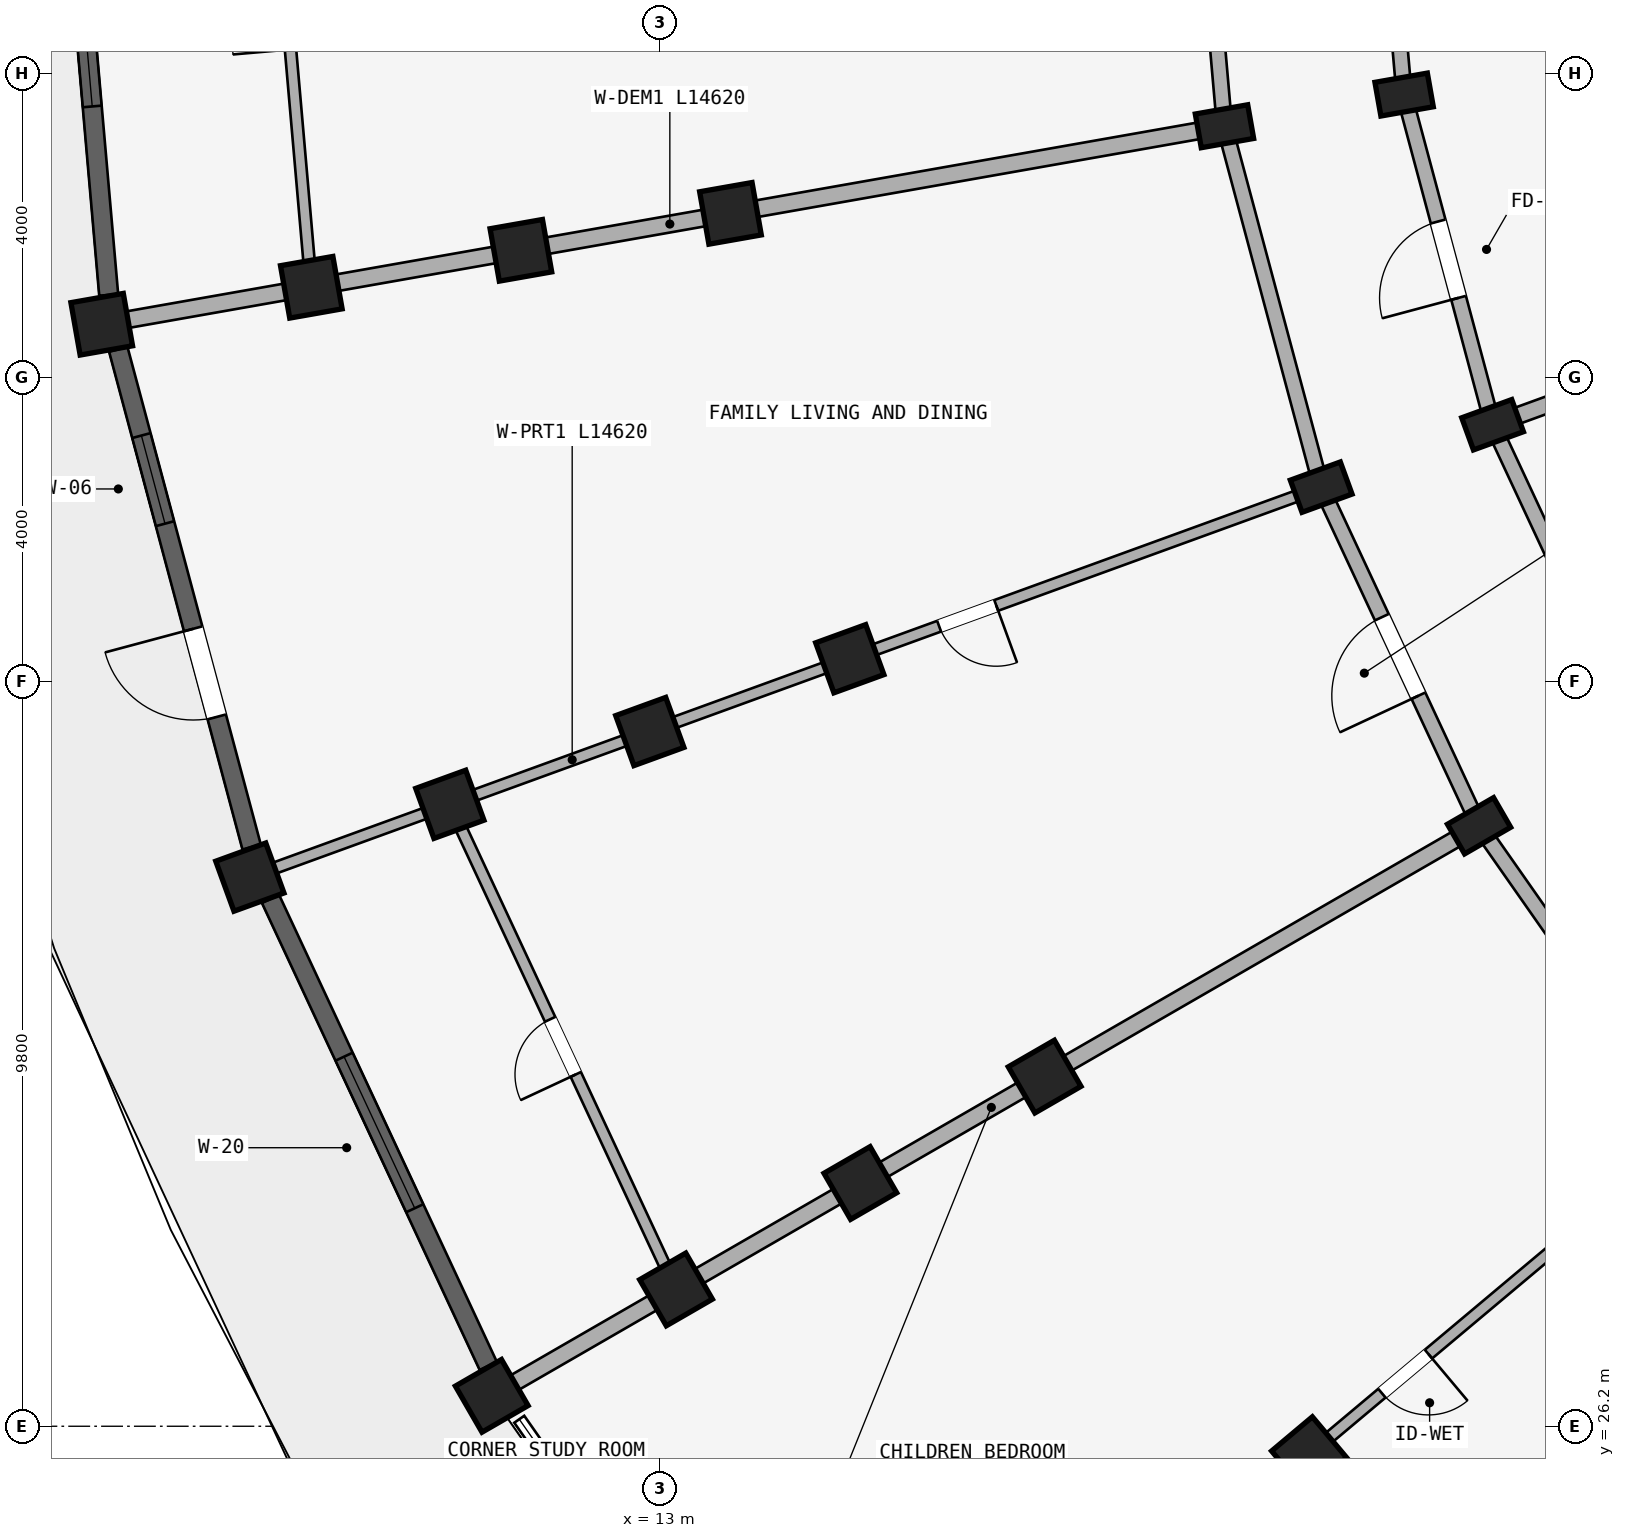
"""IFC4 building model, lengths in metres.
Left out: names, types, materials, properties, quantities, classifications, styles, units other than length and angle.
Written with IfcOpenShell. Run it as: python <this file> out.ifc"""

import sys

from ifc_helpers import new_model, si_unit, direction, frame, frame_2d, origin, origin_2d, place, context, subcontext, project, spatial, rectangle, extrude, element, fill, save


model = new_model("IFC4")
c1 = context("Model", 3, precision=1e-05, world=origin(), true_north=direction((0.0, 1.0)))
c2 = subcontext(c1, "Body", "Model", "MODEL_VIEW")
j1 = project(units=[si_unit("LENGTHUNIT", "METRE"), si_unit("PLANEANGLEUNIT", "RADIAN")], contexts=[c1])
p1 = place(None, origin())
s1 = spatial("IfcSite", under=j1, at=p1, CompositionType="ELEMENT")
p2 = place(p1, origin())
s2 = spatial("IfcBuilding", under=s1, at=p2, CompositionType="ELEMENT")
p3 = place(p2, frame((0.0, 0.0, 21.3)))
s3 = spatial("IfcBuildingStorey", under=s2, at=p3, CompositionType="ELEMENT", Elevation=21.3)
p4 = place(p3, frame((21.542, 25.831, 0.0), z_axis=(0.0, 0.0, 1.0), x_axis=(-0.642787609687, 0.766044443119, 0.0)))
e1 = element("IfcColumn", 1, at=p4, inside=s3, PredefinedType="COLUMN", context=c2, shape_type="SweptSolid", body=[
    extrude(rectangle(XDim=0.7, YDim=0.7, at=origin_2d()), origin(), (0.0, 0.0, 1.0), 2.93),
])
p5 = place(p3, frame((23.778, 34.1, 0.0), z_axis=(0.0, 0.0, 1.0), x_axis=(-0.5, 0.866025403784, 0.0)))
e2 = element("IfcColumn", 2, at=p5, inside=s3, PredefinedType="COLUMN", context=c2, shape_type="SweptSolid", body=[
    extrude(rectangle(XDim=0.45, YDim=0.7, at=origin_2d()), origin(), (0.0, 0.0, 1.0), 2.93),
])
for number, where, z_axis, x_axis in (
    (3, (18.062, 30.8, 0.0), (0.0, 0.0, 1.0), (-0.5, 0.866, 0.0)),
    (4, (15.637, 29.4, 0.0), (0.0, 0.0, 1.0), (-0.5, 0.866, 0.0)),
    (5, (13.213, 28.0, 0.0), (0.0, 0.0, 1.0), (-0.5, 0.866, 0.0)),
):
    element("IfcColumn", number, at=place(p3, frame(where, z_axis=z_axis, x_axis=x_axis)), inside=s3, PredefinedType="COLUMN", context=c2, shape_type="SweptSolid", body=[
        extrude(rectangle(XDim=0.7, YDim=0.7, at=origin_2d()), origin(), (0.0, 0.0, 1.0), 2.93),
    ])
p6 = place(p3, frame((10.788, 26.6, 0.0), z_axis=(0.0, 0.0, 1.0), x_axis=(-0.5, 0.866025403784, 0.0)))
e6 = element("IfcColumn", 6, at=p6, inside=s3, PredefinedType="COLUMN", context=c2, shape_type="SweptSolid", body=[
    extrude(rectangle(XDim=0.7, YDim=0.7, at=origin_2d()), origin(), (0.0, 0.0, 1.0), 2.97),
])
for number, where, z_axis, x_axis in (
    (7, (23.956, 39.376, 0.0), (0.0, 0.0, 1.0), (-0.342, 0.94, 0.0)),
    (8, (21.701, 38.555, 0.0), (0.0, 0.0, 1.0), (-0.342, 0.94, 0.0)),
):
    element("IfcColumn", number, at=place(p3, frame(where, z_axis=z_axis, x_axis=x_axis)), inside=s3, PredefinedType="COLUMN", context=c2, shape_type="SweptSolid", body=[
        extrude(rectangle(XDim=0.45, YDim=0.7, at=origin_2d()), origin(), (0.0, 0.0, 1.0), 2.93),
    ])
for number, where, z_axis, x_axis in (
    (9, (15.499, 36.298, 0.0), (0.0, 0.0, 1.0), (-0.342, 0.94, 0.0)),
    (10, (12.868, 35.34, 0.0), (0.0, 0.0, 1.0), (-0.342, 0.94, 0.0)),
    (11, (10.236, 34.382, 0.0), (0.0, 0.0, 1.0), (-0.342, 0.94, 0.0)),
):
    element("IfcColumn", number, at=place(p3, frame(where, z_axis=z_axis, x_axis=x_axis)), inside=s3, PredefinedType="COLUMN", context=c2, shape_type="SweptSolid", body=[
        extrude(rectangle(XDim=0.7, YDim=0.7, at=origin_2d()), origin(), (0.0, 0.0, 1.0), 2.93),
    ])
p7 = place(p3, frame((7.605, 33.425, 0.0), z_axis=(0.0, 0.0, 1.0), x_axis=(-0.342020143326, 0.939692620786, 0.0)))
e12 = element("IfcColumn", 12, at=p7, inside=s3, PredefinedType="COLUMN", context=c2, shape_type="SweptSolid", body=[
    extrude(rectangle(XDim=0.7, YDim=0.7, at=origin_2d()), origin(), (0.0, 0.0, 1.0), 2.97),
])
for number, where, z_axis, x_axis in (
    (13, (22.792, 43.72, 0.0), (0.0, 0.0, 1.0), (-0.174, 0.985, 0.0)),
    (14, (20.428, 43.303, 0.0), (0.0, 0.0, 1.0), (-0.174, 0.985, 0.0)),
):
    element("IfcColumn", number, at=place(p3, frame(where, z_axis=z_axis, x_axis=x_axis)), inside=s3, PredefinedType="COLUMN", context=c2, shape_type="SweptSolid", body=[
        extrude(rectangle(XDim=0.45, YDim=0.7, at=origin_2d()), origin(), (0.0, 0.0, 1.0), 2.93),
    ])
for number, where, z_axis, x_axis in (
    (15, (13.929, 42.157, 0.0), (0.0, 0.0, 1.0), (-0.174, 0.985, 0.0)),
    (16, (11.171, 41.671, 0.0), (0.0, 0.0, 1.0), (-0.174, 0.985, 0.0)),
    (17, (8.414, 41.185, 0.0), (0.0, 0.0, 1.0), (-0.174, 0.985, 0.0)),
):
    element("IfcColumn", number, at=place(p3, frame(where, z_axis=z_axis, x_axis=x_axis)), inside=s3, PredefinedType="COLUMN", context=c2, shape_type="SweptSolid", body=[
        extrude(rectangle(XDim=0.7, YDim=0.7, at=origin_2d()), origin(), (0.0, 0.0, 1.0), 2.93),
    ])
p8 = place(p3, frame((5.656, 40.698, 0.0), z_axis=(0.0, 0.0, 1.0), x_axis=(-0.173648177667, 0.984807753012, 0.0)))
e18 = element("IfcColumn", 18, at=p8, inside=s3, PredefinedType="COLUMN", context=c2, shape_type="SweptSolid", body=[
    extrude(rectangle(XDim=0.7, YDim=0.7, at=origin_2d()), origin(), (0.0, 0.0, 1.0), 2.97),
])
p9 = place(p3, frame((26.598, 30.073, 0.0), z_axis=(0.0, 0.0, 1.0), x_axis=(-0.573592335331, 0.819140911474, 0.0)))
e19 = element("IfcWall", 19, at=p9, inside=s3, PredefinedType="STANDARD", context=c2, shape_type="SweptSolid", body=[
    extrude(rectangle(XDim=4.916, YDim=0.2, at=frame_2d((2.458, 0.0))), origin(), (0.0, 0.0, 1.0), 2.372),
])
p10 = place(p3, frame((25.856, 35.3, 0.0), z_axis=(0.0, 0.0, 1.0), x_axis=(-0.422617978463, 0.906307919131, 0.0)))
e20 = element("IfcWall", 20, at=p10, inside=s3, PredefinedType="STANDARD", context=c2, shape_type="SweptSolid", body=[
    extrude(rectangle(XDim=4.497, YDim=0.2, at=frame_2d((2.249, 0.0))), origin(), (0.0, 0.0, 1.0), 2.372),
])
p11 = place(p3, frame((23.778, 34.1, 0.0), z_axis=(0.0, 0.0, 1.0), x_axis=(-0.422629854778, 0.906302381024, 0.0)))
e21 = element("IfcWall", 21, at=p11, inside=s3, PredefinedType="STANDARD", context=c2, shape_type="SweptSolid", body=[
    extrude(rectangle(XDim=4.915, YDim=0.2, at=frame_2d((2.458, 0.0))), origin(), (0.0, 0.0, 1.0), 2.372),
])
p12 = place(p11, frame((1.888, 0.0, 0.0)))
e22 = element("IfcOpeningElement", 22, at=p12, cuts=e21, PredefinedType="OPENING", context=c2, shape_type="SweptSolid", body=[
    extrude(rectangle(XDim=1.14, YDim=2.15, at=frame_2d((0.57, 1.075))), frame((0.0, 0.11, 0.0), z_axis=(0.0, -1.0, 0.0), x_axis=(1.0, 0.0, 0.0)), (0.0, 0.0, 1.0), 0.22),
])
p13 = place(p3, frame((23.956, 39.376, 0.0), z_axis=(0.0, 0.0, 1.0), x_axis=(-0.258787642463, 0.965934240054, 0.0)))
e23 = element("IfcWall", 23, at=p13, inside=s3, PredefinedType="STANDARD", context=c2, shape_type="SweptSolid", body=[
    extrude(rectangle(XDim=4.497, YDim=0.2, at=frame_2d((2.249, 0.0))), origin(), (0.0, 0.0, 1.0), 2.372),
])
p14 = place(p13, frame((1.729, 0.0, 0.0)))
e24 = element("IfcOpeningElement", 24, at=p14, cuts=e23, PredefinedType="OPENING", context=c2, shape_type="SweptSolid", body=[
    extrude(rectangle(XDim=1.04, YDim=2.15, at=frame_2d((0.52, 1.075))), frame((0.0, 0.11, 0.0), z_axis=(0.0, -1.0, 0.0), x_axis=(1.0, 0.0, 0.0)), (0.0, 0.0, 1.0), 0.22),
])
p15 = place(p3, frame((21.701, 38.555, 0.0), z_axis=(0.0, 0.0, 1.0), x_axis=(-0.258803112091, 0.965930095386, 0.0)))
e25 = element("IfcWall", 25, at=p15, inside=s3, PredefinedType="STANDARD", context=c2, shape_type="SweptSolid", body=[
    extrude(rectangle(XDim=4.916, YDim=0.2, at=frame_2d((2.458, 0.0))), origin(), (0.0, 0.0, 1.0), 2.372),
])
p16 = place(p3, frame((22.792, 43.72, 0.0), z_axis=(0.0, 0.0, 1.0), x_axis=(-0.087187153726, 0.996191949488, 0.0)))
e26 = element("IfcWall", 26, at=p16, inside=s3, PredefinedType="STANDARD", context=c2, shape_type="SweptSolid", body=[
    extrude(rectangle(XDim=4.497, YDim=0.2, at=frame_2d((2.249, 0.0))), origin(), (0.0, 0.0, 1.0), 2.372),
])
p17 = place(p3, frame((20.428, 43.303, 0.0), z_axis=(0.0, 0.0, 1.0), x_axis=(-0.087167566415, 0.996193663584, 0.0)))
e27 = element("IfcWall", 27, at=p17, inside=s3, PredefinedType="STANDARD", context=c2, shape_type="SweptSolid", body=[
    extrude(rectangle(XDim=4.916, YDim=0.2, at=frame_2d((2.458, 0.0))), origin(), (0.0, 0.0, 1.0), 2.372),
])
p18 = place(p17, frame((1.958, 0.0, 0.0)))
e28 = element("IfcOpeningElement", 28, at=p18, cuts=e27, PredefinedType="OPENING", context=c2, shape_type="SweptSolid", body=[
    extrude(rectangle(XDim=1.0, YDim=2.15, at=frame_2d((0.5, 1.075))), frame((0.0, 0.11, 0.0), z_axis=(0.0, -1.0, 0.0), x_axis=(1.0, 0.0, 0.0)), (0.0, 0.0, 1.0), 0.22),
])
p19 = place(p3, frame((30.009, 26.521, 0.0), z_axis=(0.0, 0.0, 1.0), x_axis=(-0.642779216656, -0.76605148563, 0.0)))
e29 = element("IfcWall", 29, at=p19, inside=s3, PredefinedType="PARTITIONING", context=c2, shape_type="SweptSolid", body=[
    extrude(rectangle(XDim=14.62, YDim=0.15, at=frame_2d((7.31, 0.0))), origin(), (0.0, 0.0, 1.0), 2.372),
])
p20 = place(p19, frame((4.449, 0.0, 0.0)))
e30 = element("IfcOpeningElement", 30, at=p20, cuts=e29, PredefinedType="OPENING", context=c2, shape_type="SweptSolid", body=[
    extrude(rectangle(XDim=0.8, YDim=2.1, at=frame_2d((0.4, 1.05))), frame((0.0, 0.085, 0.0), z_axis=(0.0, -1.0, 0.0), x_axis=(1.0, 0.0, 0.0)), (0.0, 0.0, 1.0), 0.17),
])
p21 = place(p3, frame((26.521, 30.009, 0.0), z_axis=(0.0, 0.0, 1.0), x_axis=(-0.76605148563, -0.642779216656, 0.0)))
e31 = element("IfcWall", 31, at=p21, inside=s3, PredefinedType="PARTITIONING", context=c2, shape_type="SweptSolid", body=[
    extrude(rectangle(XDim=14.62, YDim=0.15, at=frame_2d((7.31, 0.0))), origin(), (0.0, 0.0, 1.0), 2.372),
])
p22 = place(p21, frame((4.449, 0.0, 0.0)))
e32 = element("IfcOpeningElement", 32, at=p22, cuts=e31, PredefinedType="OPENING", context=c2, shape_type="SweptSolid", body=[
    extrude(rectangle(XDim=0.8, YDim=2.1, at=frame_2d((0.4, 1.05))), frame((0.0, 0.085, 0.0), z_axis=(0.0, -1.0, 0.0), x_axis=(1.0, 0.0, 0.0)), (0.0, 0.0, 1.0), 0.17),
])
p23 = place(p3, frame((23.691, 34.05, 0.0), z_axis=(0.0, 0.0, 1.0), x_axis=(-0.866020956416, -0.500007702989, 0.0)))
e33 = element("IfcWall", 33, at=p23, inside=s3, PredefinedType="STANDARD", context=c2, shape_type="SweptSolid", body=[
    extrude(rectangle(XDim=14.62, YDim=0.22, at=frame_2d((7.31, 0.0))), origin(), (0.0, 0.0, 1.0), 2.372),
])
p24 = place(p3, frame((30.346, 41.702, 0.0), z_axis=(0.0, 0.0, 1.0), x_axis=(-0.939696231917, -0.342010221662, 0.0)))
e34 = element("IfcWall", 34, at=p24, inside=s3, PredefinedType="STANDARD", context=c2, shape_type="SweptSolid", body=[
    extrude(rectangle(XDim=6.75, YDim=0.22, at=frame_2d((3.375, 0.0))), origin(), (0.0, 0.0, 1.0), 2.372),
])
p25 = place(p3, frame((21.607, 38.521, 0.0), z_axis=(0.0, 0.0, 1.0), x_axis=(-0.939694408106, -0.342015232663, 0.0)))
e35 = element("IfcWall", 35, at=p25, inside=s3, PredefinedType="PARTITIONING", context=c2, shape_type="SweptSolid", body=[
    extrude(rectangle(XDim=14.62, YDim=0.15, at=frame_2d((7.31, 0.0))), origin(), (0.0, 0.0, 1.0), 2.372),
])
p26 = place(p25, frame((4.449, 0.0, 0.0)))
e36 = element("IfcOpeningElement", 36, at=p26, cuts=e35, PredefinedType="OPENING", context=c2, shape_type="SweptSolid", body=[
    extrude(rectangle(XDim=0.8, YDim=2.1, at=frame_2d((0.4, 1.05))), frame((0.0, 0.085, 0.0), z_axis=(0.0, -1.0, 0.0), x_axis=(1.0, 0.0, 0.0)), (0.0, 0.0, 1.0), 0.17),
])
p27 = place(p3, frame((20.33, 43.286, 0.0), z_axis=(0.0, 0.0, 1.0), x_axis=(-0.984809269474, -0.173639577162, 0.0)))
e37 = element("IfcWall", 37, at=p27, inside=s3, PredefinedType="STANDARD", context=c2, shape_type="SweptSolid", body=[
    extrude(rectangle(XDim=14.62, YDim=0.22, at=frame_2d((7.31, 0.0))), origin(), (0.0, 0.0, 1.0), 2.372),
])
p28 = place(p3, frame((13.213, 28.0, 0.0), z_axis=(0.0, 0.0, 1.0), x_axis=(-0.422640621205, 0.906297360311, 0.0)))
e38 = element("IfcWall", 38, at=p28, inside=s3, PredefinedType="PLUMBINGWALL", context=c2, shape_type="SweptSolid", body=[
    extrude(rectangle(XDim=7.042, YDim=0.15, at=frame_2d((3.521, 0.0))), origin(), (0.0, 0.0, 1.0), 2.372),
])
p29 = place(p28, frame((3.121, 0.0, 0.0)))
e39 = element("IfcOpeningElement", 39, at=p29, cuts=e38, PredefinedType="OPENING", context=c2, shape_type="SweptSolid", body=[
    extrude(rectangle(XDim=0.8, YDim=2.1, at=frame_2d((0.4, 1.05))), frame((0.0, 0.085, 0.0), z_axis=(0.0, -1.0, 0.0), x_axis=(1.0, 0.0, 0.0)), (0.0, 0.0, 1.0), 0.17),
])
p30 = place(p3, frame((8.414, 41.185, 0.0), z_axis=(0.0, 0.0, 1.0), x_axis=(-0.087156198737, 0.996194658198, 0.0)))
e40 = element("IfcWall", 40, at=p30, inside=s3, PredefinedType="PLUMBINGWALL", context=c2, shape_type="SweptSolid", body=[
    extrude(rectangle(XDim=7.042, YDim=0.15, at=frame_2d((3.521, 0.0))), origin(), (0.0, 0.0, 1.0), 2.372),
])
p31 = place(p30, frame((3.141, 0.0, 0.0)))
e41 = element("IfcOpeningElement", 41, at=p31, cuts=e40, PredefinedType="OPENING", context=c2, shape_type="SweptSolid", body=[
    extrude(rectangle(XDim=0.76, YDim=2.05, at=frame_2d((0.38, 1.025))), frame((0.0, 0.085, 0.0), z_axis=(0.0, -1.0, 0.0), x_axis=(1.0, 0.0, 0.0)), (0.0, 0.0, 1.0), 0.17),
])
p32 = place(p3, frame((10.742, 26.993, 0.0), z_axis=(0.0, 0.0, 1.0), x_axis=(-0.422613353553, 0.906310075746, 0.0)))
e42 = element("IfcWall", 42, at=p32, inside=s3, PredefinedType="STANDARD", context=c2, shape_type="SweptSolid", body=[
    extrude(rectangle(XDim=6.779, YDim=0.25, at=frame_2d((3.389, 0.0))), origin(), (0.0, 0.0, 1.0), 2.48),
])
p33 = place(p32, frame((2.289, 0.0, 0.38)))
e43 = element("IfcOpeningElement", 43, at=p33, cuts=e42, PredefinedType="OPENING", context=c2, shape_type="SweptSolid", body=[
    extrude(rectangle(XDim=2.2, YDim=1.9, at=frame_2d((1.1, 0.95))), frame((0.0, 0.135, 0.0), z_axis=(0.0, -1.0, 0.0), x_axis=(1.0, 0.0, 0.0)), (0.0, 0.0, 1.0), 0.27),
])
p34 = place(p3, frame((7.629, 33.82, 0.0), z_axis=(0.0, 0.0, 1.0), x_axis=(-0.258814697035, 0.96592699134, 0.0)))
e44 = element("IfcWall", 44, at=p34, inside=s3, PredefinedType="STANDARD", context=c2, shape_type="SweptSolid", body=[
    extrude(rectangle(XDim=6.779, YDim=0.25, at=frame_2d((3.389, 0.0))), origin(), (0.0, 0.0, 1.0), 2.48),
])
p35 = place(p34, frame((4.405, 0.0, 0.53)))
e45 = element("IfcOpeningElement", 45, at=p35, cuts=e44, PredefinedType="OPENING", context=c2, shape_type="SweptSolid", body=[
    extrude(rectangle(XDim=1.2, YDim=1.5, at=frame_2d((0.6, 0.75))), frame((0.0, 0.135, 0.0), z_axis=(0.0, -1.0, 0.0), x_axis=(1.0, 0.0, 0.0)), (0.0, 0.0, 1.0), 0.27),
])
p36 = place(p34, frame((1.772, 0.0, 0.0)))
e46 = element("IfcOpeningElement", 46, at=p36, cuts=e44, PredefinedType="OPENING", context=c2, shape_type="SweptSolid", body=[
    extrude(rectangle(XDim=1.2, YDim=2.15, at=frame_2d((0.6, 1.075))), frame((0.0, 0.135, 0.0), z_axis=(0.0, -1.0, 0.0), x_axis=(1.0, 0.0, 0.0)), (0.0, 0.0, 1.0), 0.27),
])
p37 = place(p3, frame((5.748, 41.084, 0.0), z_axis=(0.0, 0.0, 1.0), x_axis=(-0.087161141987, 0.996194225705, 0.0)))
e47 = element("IfcWall", 47, at=p37, inside=s3, PredefinedType="STANDARD", context=c2, shape_type="SweptSolid", body=[
    extrude(rectangle(XDim=6.779, YDim=0.25, at=frame_2d((3.389, 0.0))), origin(), (0.0, 0.0, 1.0), 2.48),
])
p38 = place(p37, frame((2.489, 0.0, 0.63)))
e48 = element("IfcOpeningElement", 48, at=p38, cuts=e47, PredefinedType="OPENING", context=c2, shape_type="SweptSolid", body=[
    extrude(rectangle(XDim=1.8, YDim=1.65, at=frame_2d((0.9, 0.825))), frame((0.0, 0.135, 0.0), z_axis=(0.0, -1.0, 0.0), x_axis=(1.0, 0.0, 0.0)), (0.0, 0.0, 1.0), 0.27),
])
p39 = place(p33, origin())
e49 = element("IfcWindow", 49, at=p39, inside=s3, PartitioningType="TRIPLE_PANEL_VERTICAL", PredefinedType="WINDOW", context=c2, shape_type="SweptSolid", body=[
    extrude(rectangle(XDim=2.2, YDim=1.9, at=frame_2d((1.1, 0.95))), frame((0.0, 0.03, 0.0), z_axis=(0.0, -1.0, 0.0), x_axis=(1.0, 0.0, 0.0)), (0.0, 0.0, 1.0), 0.06),
])
fill(e43, e49)
p40 = place(p35, origin())
e50 = element("IfcWindow", 50, at=p40, inside=s3, PartitioningType="SINGLE_PANEL", PredefinedType="WINDOW", context=c2, shape_type="SweptSolid", body=[
    extrude(rectangle(XDim=1.2, YDim=1.5, at=frame_2d((0.6, 0.75))), frame((0.0, 0.03, 0.0), z_axis=(0.0, -1.0, 0.0), x_axis=(1.0, 0.0, 0.0)), (0.0, 0.0, 1.0), 0.06),
])
fill(e45, e50)
p41 = place(p38, origin())
e51 = element("IfcWindow", 51, at=p41, inside=s3, PartitioningType="DOUBLE_PANEL_VERTICAL", PredefinedType="WINDOW", context=c2, shape_type="SweptSolid", body=[
    extrude(rectangle(XDim=1.8, YDim=1.65, at=frame_2d((0.9, 0.825))), frame((0.0, 0.03, 0.0), z_axis=(0.0, -1.0, 0.0), x_axis=(1.0, 0.0, 0.0)), (0.0, 0.0, 1.0), 0.06),
])
fill(e48, e51)
p42 = place(p22, frame((0.8, 0.0, 0.0), z_axis=(0.0, 0.0, 1.0), x_axis=(-1.0, 0.0, 0.0)))
e52 = element("IfcDoor", 52, at=p42, inside=s3, OperationType="SINGLE_SWING_RIGHT", PredefinedType="DOOR", context=c2, shape_type="SweptSolid", body=[
    extrude(rectangle(XDim=0.8, YDim=2.1, at=frame_2d((0.4, 1.05))), frame((0.0, 0.025, 0.0), z_axis=(0.0, -1.0, 0.0), x_axis=(1.0, 0.0, 0.0)), (0.0, 0.0, 1.0), 0.05),
])
fill(e32, e52)
p43 = place(p26, origin())
e53 = element("IfcDoor", 53, at=p43, inside=s3, OperationType="SINGLE_SWING_LEFT", PredefinedType="DOOR", context=c2, shape_type="SweptSolid", body=[
    extrude(rectangle(XDim=0.8, YDim=2.1, at=frame_2d((0.4, 1.05))), frame((0.0, 0.025, 0.0), z_axis=(0.0, -1.0, 0.0), x_axis=(1.0, 0.0, 0.0)), (0.0, 0.0, 1.0), 0.05),
])
fill(e36, e53)
p44 = place(p12, frame((1.14, 0.0, 0.0), z_axis=(0.0, 0.0, 1.0), x_axis=(-1.0, 0.0, 0.0)))
e54 = element("IfcDoor", 54, at=p44, inside=s3, OperationType="SINGLE_SWING_RIGHT", PredefinedType="DOOR", context=c2, shape_type="SweptSolid", body=[
    extrude(rectangle(XDim=1.14, YDim=2.15, at=frame_2d((0.57, 1.075))), frame((0.0, 0.025, 0.0), z_axis=(0.0, -1.0, 0.0), x_axis=(1.0, 0.0, 0.0)), (0.0, 0.0, 1.0), 0.05),
])
fill(e22, e54)
p45 = place(p29, origin())
e55 = element("IfcDoor", 55, at=p45, inside=s3, OperationType="SINGLE_SWING_LEFT", PredefinedType="DOOR", context=c2, shape_type="SweptSolid", body=[
    extrude(rectangle(XDim=0.8, YDim=2.1, at=frame_2d((0.4, 1.05))), frame((0.0, 0.025, 0.0), z_axis=(0.0, -1.0, 0.0), x_axis=(1.0, 0.0, 0.0)), (0.0, 0.0, 1.0), 0.05),
])
fill(e39, e55)
p46 = place(p14, origin())
e56 = element("IfcDoor", 56, at=p46, inside=s3, OperationType="SINGLE_SWING_LEFT", PredefinedType="DOOR", context=c2, shape_type="SweptSolid", body=[
    extrude(rectangle(XDim=1.04, YDim=2.15, at=frame_2d((0.52, 1.075))), frame((0.0, 0.025, 0.0), z_axis=(0.0, -1.0, 0.0), x_axis=(1.0, 0.0, 0.0)), (0.0, 0.0, 1.0), 0.05),
])
fill(e24, e56)
p47 = place(p36, origin())
e57 = element("IfcDoor", 57, at=p47, inside=s3, OperationType="SINGLE_SWING_RIGHT", PredefinedType="DOOR", context=c2, shape_type="SweptSolid", body=[
    extrude(rectangle(XDim=1.2, YDim=2.15, at=frame_2d((0.6, 1.075))), frame((0.0, 0.025, 0.0), z_axis=(0.0, -1.0, 0.0), x_axis=(1.0, 0.0, 0.0)), (0.0, 0.0, 1.0), 0.05),
])
fill(e46, e57)
save(model, sys.argv[1])
